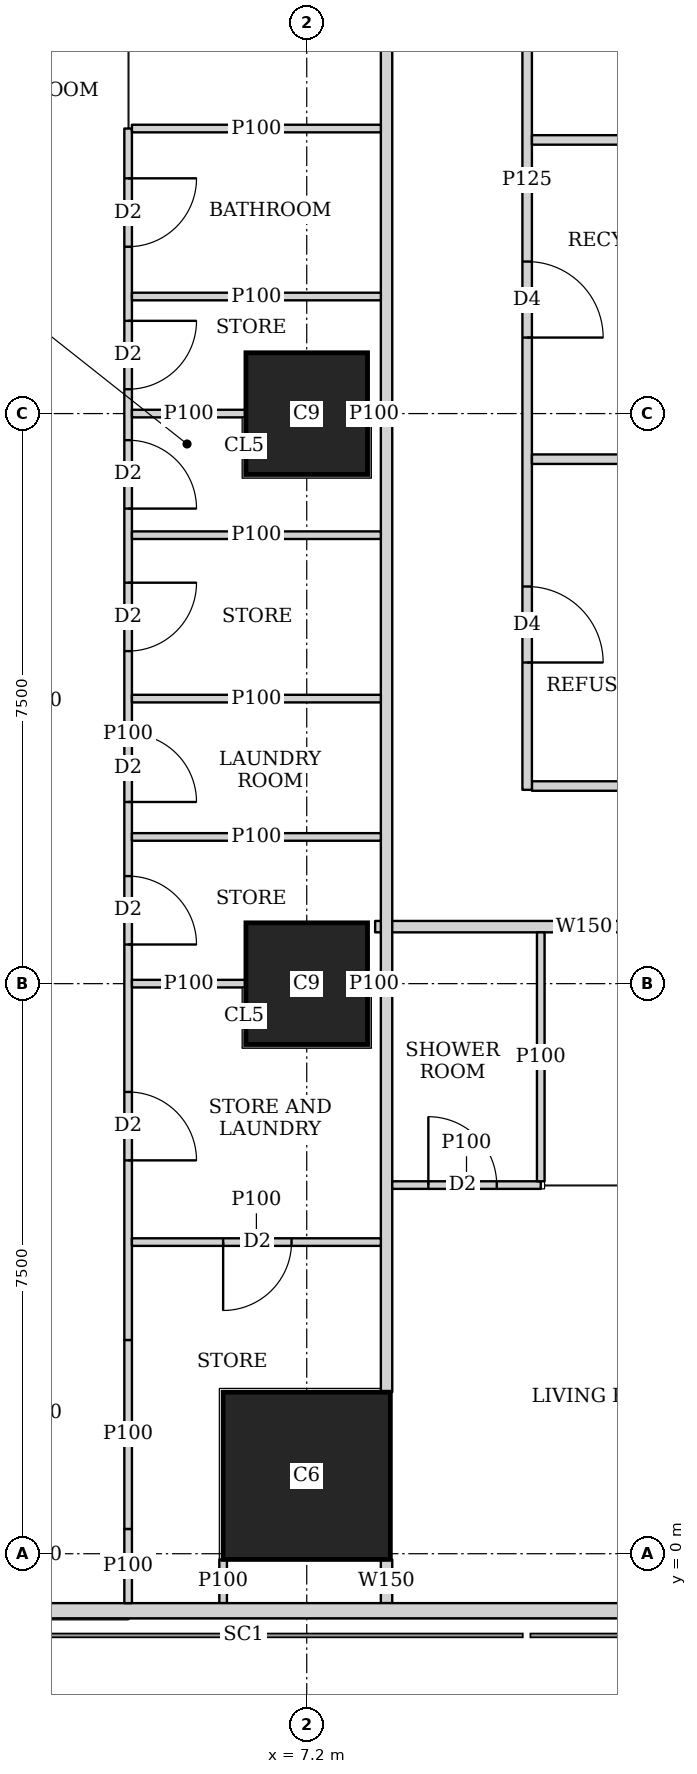
"""IFC4 building model, lengths in metres.
Left out: names, types, materials, properties, quantities, classifications, styles, units other than length and angle.
Written with IfcOpenShell. Run it as: python <this file> out.ifc"""

import sys

from ifc_helpers import new_model, si_unit, direction, frame, frame_2d, origin, origin_2d, place, context, subcontext, project, spatial, rectangle, extrude, element, fill, save


model = new_model("IFC4")
c1 = context("Model", 3, precision=1e-05, world=origin(), true_north=direction((0.0, 1.0)))
c2 = subcontext(c1, "Body", "Model", "MODEL_VIEW")
j1 = project(units=[si_unit("LENGTHUNIT", "METRE"), si_unit("PLANEANGLEUNIT", "RADIAN")], contexts=[c1])
p1 = place(None, origin())
s1 = spatial("IfcSite", under=j1, at=p1, CompositionType="ELEMENT")
p2 = place(p1, origin())
s2 = spatial("IfcBuilding", under=s1, at=p2, CompositionType="ELEMENT")
p3 = place(p2, frame((0.0, 0.0, 81.65)))
s3 = spatial("IfcBuildingStorey", under=s2, at=p3, CompositionType="ELEMENT", Elevation=81.65)
p4 = place(p3, frame((7.2, 1.025, 0.0), z_axis=(0.0, 0.0, 1.0), x_axis=(1.0, 0.0, 0.0)))
e1 = element("IfcColumn", 1, at=p4, inside=s3, PredefinedType="COLUMN", context=c2, shape_type="SweptSolid", body=[
    extrude(rectangle(XDim=2.2, YDim=2.2, at=origin_2d()), origin(), (0.0, 0.0, 1.0), 3.75),
])
for number, where, z_axis, x_axis in (
    (2, (7.2, 7.5, 0.0), (0.0, 0.0, 1.0), (1.0, 0.0, 0.0)),
    (3, (7.2, 15.0, 0.0), (0.0, 0.0, 1.0), (1.0, 0.0, 0.0)),
):
    element("IfcColumn", number, at=place(p3, frame(where, z_axis=z_axis, x_axis=x_axis)), inside=s3, PredefinedType="COLUMN", context=c2, shape_type="SweptSolid", body=[
        extrude(rectangle(XDim=1.6, YDim=1.6, at=origin_2d()), origin(), (0.0, 0.0, 1.0), 3.75),
    ])
p5 = place(p3, frame((2.163, -0.75, 0.0), z_axis=(0.0, 0.0, 1.0), x_axis=(1.0, 0.0, 0.0)))
e4 = element("IfcWall", 4, at=p5, inside=s3, PredefinedType="SOLIDWALL", context=c2, shape_type="SweptSolid", body=[
    extrude(rectangle(XDim=45.628, YDim=0.2, at=frame_2d((22.814, 0.0))), origin(), (0.0, 0.0, 1.0), 3.5),
])
p6 = place(p5, frame((9.537, 0.0, 0.9)))
e5 = element("IfcOpeningElement", 5, at=p6, cuts=e4, PredefinedType="OPENING", context=c2, shape_type="SweptSolid", body=[
    extrude(rectangle(XDim=1.8, YDim=1.5, at=frame_2d((0.9, 0.75))), frame((0.0, 0.11, 0.0), z_axis=(0.0, -1.0, 0.0), x_axis=(1.0, 0.0, 0.0)), (0.0, 0.0, 1.0), 0.22),
])
p7 = place(p5, frame((13.137, 0.0, 0.9)))
e6 = element("IfcOpeningElement", 6, at=p7, cuts=e4, PredefinedType="OPENING", context=c2, shape_type="SweptSolid", body=[
    extrude(rectangle(XDim=1.8, YDim=1.5, at=frame_2d((0.9, 0.75))), frame((0.0, 0.11, 0.0), z_axis=(0.0, -1.0, 0.0), x_axis=(1.0, 0.0, 0.0)), (0.0, 0.0, 1.0), 0.22),
])
p8 = place(p5, frame((16.737, 0.0, 0.9)))
e7 = element("IfcOpeningElement", 7, at=p8, cuts=e4, PredefinedType="OPENING", context=c2, shape_type="SweptSolid", body=[
    extrude(rectangle(XDim=1.8, YDim=1.5, at=frame_2d((0.9, 0.75))), frame((0.0, 0.11, 0.0), z_axis=(0.0, -1.0, 0.0), x_axis=(1.0, 0.0, 0.0)), (0.0, 0.0, 1.0), 0.22),
])
p9 = place(p5, frame((20.337, 0.0, 0.9)))
e8 = element("IfcOpeningElement", 8, at=p9, cuts=e4, PredefinedType="OPENING", context=c2, shape_type="SweptSolid", body=[
    extrude(rectangle(XDim=1.8, YDim=1.5, at=frame_2d((0.9, 0.75))), frame((0.0, 0.11, 0.0), z_axis=(0.0, -1.0, 0.0), x_axis=(1.0, 0.0, 0.0)), (0.0, 0.0, 1.0), 0.22),
])
p10 = place(p5, frame((23.937, 0.0, 0.9)))
e9 = element("IfcOpeningElement", 9, at=p10, cuts=e4, PredefinedType="OPENING", context=c2, shape_type="SweptSolid", body=[
    extrude(rectangle(XDim=1.8, YDim=1.5, at=frame_2d((0.9, 0.75))), frame((0.0, 0.11, 0.0), z_axis=(0.0, -1.0, 0.0), x_axis=(1.0, 0.0, 0.0)), (0.0, 0.0, 1.0), 0.22),
])
p11 = place(p5, frame((27.537, 0.0, 0.9)))
e10 = element("IfcOpeningElement", 10, at=p11, cuts=e4, PredefinedType="OPENING", context=c2, shape_type="SweptSolid", body=[
    extrude(rectangle(XDim=1.8, YDim=1.5, at=frame_2d((0.9, 0.75))), frame((0.0, 0.11, 0.0), z_axis=(0.0, -1.0, 0.0), x_axis=(1.0, 0.0, 0.0)), (0.0, 0.0, 1.0), 0.22),
])
p12 = place(p5, frame((31.137, 0.0, 0.9)))
e11 = element("IfcOpeningElement", 11, at=p12, cuts=e4, PredefinedType="OPENING", context=c2, shape_type="SweptSolid", body=[
    extrude(rectangle(XDim=1.8, YDim=1.5, at=frame_2d((0.9, 0.75))), frame((0.0, 0.11, 0.0), z_axis=(0.0, -1.0, 0.0), x_axis=(1.0, 0.0, 0.0)), (0.0, 0.0, 1.0), 0.22),
])
p13 = place(p5, frame((34.737, 0.0, 0.9)))
e12 = element("IfcOpeningElement", 12, at=p13, cuts=e4, PredefinedType="OPENING", context=c2, shape_type="SweptSolid", body=[
    extrude(rectangle(XDim=1.8, YDim=1.5, at=frame_2d((0.9, 0.75))), frame((0.0, 0.11, 0.0), z_axis=(0.0, -1.0, 0.0), x_axis=(1.0, 0.0, 0.0)), (0.0, 0.0, 1.0), 0.22),
])
p14 = place(p3, frame((8.25, -0.65, 0.0), z_axis=(0.0, 0.0, 1.0), x_axis=(0.0, 1.0, 0.0)))
e13 = element("IfcWall", 13, at=p14, inside=s3, PredefinedType="SOLIDWALL", context=c2, shape_type="SweptSolid", body=[
    extrude(rectangle(XDim=0.574, YDim=0.15, at=frame_2d((0.287, 0.0))), origin(), (0.0, 0.0, 1.0), 3.5),
])
p15 = place(p3, frame((8.25, 2.126, 0.0), z_axis=(0.0, 0.0, 1.0), x_axis=(0.0, 1.0, 0.0)))
e14 = element("IfcWall", 14, at=p15, inside=s3, PredefinedType="SOLIDWALL", context=c2, shape_type="SweptSolid", body=[
    extrude(rectangle(XDim=40.773, YDim=0.15, at=frame_2d((20.386, 0.0))), origin(), (0.0, 0.0, 1.0), 3.5),
])
p16 = place(p15, frame((17.787, 0.0, 0.0)))
e15 = element("IfcOpeningElement", 15, at=p16, cuts=e14, PredefinedType="OPENING", context=c2, shape_type="SweptSolid", body=[
    extrude(rectangle(XDim=1.0, YDim=2.1, at=frame_2d((0.5, 1.05))), frame((0.0, 0.085, 0.0), z_axis=(0.0, -1.0, 0.0), x_axis=(1.0, 0.0, 0.0)), (0.0, 0.0, 1.0), 0.17),
])
p17 = place(p15, frame((21.962, 0.0, 0.0)))
e16 = element("IfcOpeningElement", 16, at=p17, cuts=e14, PredefinedType="OPENING", context=c2, shape_type="SweptSolid", body=[
    extrude(rectangle(XDim=1.0, YDim=2.1, at=frame_2d((0.5, 1.05))), frame((0.0, 0.085, 0.0), z_axis=(0.0, -1.0, 0.0), x_axis=(1.0, 0.0, 0.0)), (0.0, 0.0, 1.0), 0.17),
])
p18 = place(p15, frame((32.787, 0.0, 0.0)))
e17 = element("IfcOpeningElement", 17, at=p18, cuts=e14, PredefinedType="OPENING", context=c2, shape_type="SweptSolid", body=[
    extrude(rectangle(XDim=1.0, YDim=2.1, at=frame_2d((0.5, 1.05))), frame((0.0, 0.085, 0.0), z_axis=(0.0, -1.0, 0.0), x_axis=(1.0, 0.0, 0.0)), (0.0, 0.0, 1.0), 0.17),
])
p19 = place(p3, frame((13.599, 8.25, 0.0), z_axis=(0.0, 0.0, 1.0), x_axis=(-1.0, 0.0, 0.0)))
e18 = element("IfcWall", 18, at=p19, inside=s3, PredefinedType="SOLIDWALL", context=c2, shape_type="SweptSolid", body=[
    extrude(rectangle(XDim=5.499, YDim=0.15, at=frame_2d((2.75, 0.0))), origin(), (0.0, 0.0, 1.0), 3.5),
])
p20 = place(p19, frame((0.76, 0.0, 0.0)))
e19 = element("IfcOpeningElement", 19, at=p20, cuts=e18, PredefinedType="OPENING", context=c2, shape_type="SweptSolid", body=[
    extrude(rectangle(XDim=1.0, YDim=2.1, at=frame_2d((0.5, 1.05))), frame((0.0, 0.085, 0.0), z_axis=(0.0, -1.0, 0.0), x_axis=(1.0, 0.0, 0.0)), (0.0, 0.0, 1.0), 0.17),
])
p21 = place(p3, frame((6.1, -0.65, 0.0), z_axis=(0.0, 0.0, 1.0), x_axis=(0.0, 1.0, 0.0)))
e20 = element("IfcWall", 20, at=p21, inside=s3, PredefinedType="PARTITIONING", context=c2, shape_type="SweptSolid", body=[
    extrude(rectangle(XDim=0.575, YDim=0.1, at=frame_2d((0.288, 0.0))), origin(), (0.0, 0.0, 1.0), 3.5),
])
p22 = place(p3, frame((4.85, -0.65, 0.0), z_axis=(0.0, 0.0, 1.0), x_axis=(0.0, 1.0, 0.0)))
e21 = element("IfcWall", 21, at=p22, inside=s3, PredefinedType="PARTITIONING", context=c2, shape_type="SweptSolid", body=[
    extrude(rectangle(XDim=0.976, YDim=0.1, at=frame_2d((0.488, 0.0))), origin(), (0.0, 0.0, 1.0), 3.5),
])
p23 = place(p3, frame((4.85, 0.326, 0.0), z_axis=(0.0, 0.0, 1.0), x_axis=(0.0, 1.0, 0.0)))
e22 = element("IfcWall", 22, at=p23, inside=s3, PredefinedType="PARTITIONING", context=c2, shape_type="SweptSolid", body=[
    extrude(rectangle(XDim=2.486, YDim=0.1, at=frame_2d((1.243, 0.0))), origin(), (0.0, 0.0, 1.0), 2.05),
])
p24 = place(p3, frame((4.85, 2.812, 0.0), z_axis=(0.0, 0.0, 1.0), x_axis=(0.0, 1.0, 0.0)))
e23 = element("IfcWall", 23, at=p24, inside=s3, PredefinedType="PARTITIONING", context=c2, shape_type="SweptSolid", body=[
    extrude(rectangle(XDim=15.938, YDim=0.1, at=frame_2d((7.969, 0.0))), origin(), (0.0, 0.0, 1.0), 3.5),
])
p25 = place(p24, frame((14.383, 0.0, 0.0)))
e24 = element("IfcOpeningElement", 24, at=p25, cuts=e23, PredefinedType="OPENING", context=c2, shape_type="SweptSolid", body=[
    extrude(rectangle(XDim=0.9, YDim=2.1, at=frame_2d((0.45, 1.05))), frame((0.0, 0.06, 0.0), z_axis=(0.0, -1.0, 0.0), x_axis=(1.0, 0.0, 0.0)), (0.0, 0.0, 1.0), 0.12),
])
p26 = place(p24, frame((10.938, 0.0, 0.0)))
e25 = element("IfcOpeningElement", 25, at=p26, cuts=e23, PredefinedType="OPENING", context=c2, shape_type="SweptSolid", body=[
    extrude(rectangle(XDim=0.9, YDim=2.1, at=frame_2d((0.45, 1.05))), frame((0.0, 0.06, 0.0), z_axis=(0.0, -1.0, 0.0), x_axis=(1.0, 0.0, 0.0)), (0.0, 0.0, 1.0), 0.12),
])
p27 = place(p24, frame((7.078, 0.0, 0.0)))
e26 = element("IfcOpeningElement", 26, at=p27, cuts=e23, PredefinedType="OPENING", context=c2, shape_type="SweptSolid", body=[
    extrude(rectangle(XDim=0.9, YDim=2.1, at=frame_2d((0.45, 1.05))), frame((0.0, 0.06, 0.0), z_axis=(0.0, -1.0, 0.0), x_axis=(1.0, 0.0, 0.0)), (0.0, 0.0, 1.0), 0.12),
])
p28 = place(p24, frame((2.363, 0.0, 0.0)))
e27 = element("IfcOpeningElement", 27, at=p28, cuts=e23, PredefinedType="OPENING", context=c2, shape_type="SweptSolid", body=[
    extrude(rectangle(XDim=0.9, YDim=2.1, at=frame_2d((0.45, 1.05))), frame((0.0, 0.06, 0.0), z_axis=(0.0, -1.0, 0.0), x_axis=(1.0, 0.0, 0.0)), (0.0, 0.0, 1.0), 0.12),
])
p29 = place(p24, frame((12.508, 0.0, 0.0)))
e28 = element("IfcOpeningElement", 28, at=p29, cuts=e23, PredefinedType="OPENING", context=c2, shape_type="SweptSolid", body=[
    extrude(rectangle(XDim=0.9, YDim=2.1, at=frame_2d((0.45, 1.05))), frame((0.0, 0.06, 0.0), z_axis=(0.0, -1.0, 0.0), x_axis=(1.0, 0.0, 0.0)), (0.0, 0.0, 1.0), 0.12),
])
p30 = place(p24, frame((9.063, 0.0, 0.0)))
e29 = element("IfcOpeningElement", 29, at=p30, cuts=e23, PredefinedType="OPENING", context=c2, shape_type="SweptSolid", body=[
    extrude(rectangle(XDim=0.9, YDim=2.1, at=frame_2d((0.45, 1.05))), frame((0.0, 0.06, 0.0), z_axis=(0.0, -1.0, 0.0), x_axis=(1.0, 0.0, 0.0)), (0.0, 0.0, 1.0), 0.12),
])
p31 = place(p24, frame((5.203, 0.0, 0.0)))
e30 = element("IfcOpeningElement", 30, at=p31, cuts=e23, PredefinedType="OPENING", context=c2, shape_type="SweptSolid", body=[
    extrude(rectangle(XDim=0.9, YDim=2.1, at=frame_2d((0.45, 1.05))), frame((0.0, 0.06, 0.0), z_axis=(0.0, -1.0, 0.0), x_axis=(1.0, 0.0, 0.0)), (0.0, 0.0, 1.0), 0.12),
])
p32 = place(p3, frame((4.9, 7.5, 0.0), z_axis=(0.0, 0.0, 1.0), x_axis=(1.0, 0.0, 0.0)))
e31 = element("IfcWall", 31, at=p32, inside=s3, PredefinedType="PARTITIONING", context=c2, shape_type="SweptSolid", body=[
    extrude(rectangle(XDim=1.499, YDim=0.1, at=frame_2d((0.75, 0.0))), origin(), (0.0, 0.0, 1.0), 3.5),
])
p33 = place(p3, frame((8.001, 7.5, 0.0), z_axis=(0.0, 0.0, 1.0), x_axis=(1.0, 0.0, 0.0)))
e32 = element("IfcWall", 32, at=p33, inside=s3, PredefinedType="PARTITIONING", context=c2, shape_type="SweptSolid", body=[
    extrude(rectangle(XDim=0.174, YDim=0.1, at=frame_2d((0.087, 0.0))), origin(), (0.0, 0.0, 1.0), 3.5),
])
p34 = place(p3, frame((4.9, 11.25, 0.0), z_axis=(0.0, 0.0, 1.0), x_axis=(1.0, 0.0, 0.0)))
e33 = element("IfcWall", 33, at=p34, inside=s3, PredefinedType="PARTITIONING", context=c2, shape_type="SweptSolid", body=[
    extrude(rectangle(XDim=3.275, YDim=0.1, at=frame_2d((1.638, 0.0))), origin(), (0.0, 0.0, 1.0), 3.5),
])
p35 = place(p3, frame((4.9, 15.0, 0.0), z_axis=(0.0, 0.0, 1.0), x_axis=(1.0, 0.0, 0.0)))
e34 = element("IfcWall", 34, at=p35, inside=s3, PredefinedType="PARTITIONING", context=c2, shape_type="SweptSolid", body=[
    extrude(rectangle(XDim=1.499, YDim=0.1, at=frame_2d((0.75, 0.0))), origin(), (0.0, 0.0, 1.0), 3.5),
])
p36 = place(p3, frame((8.001, 15.0, 0.0), z_axis=(0.0, 0.0, 1.0), x_axis=(1.0, 0.0, 0.0)))
e35 = element("IfcWall", 35, at=p36, inside=s3, PredefinedType="PARTITIONING", context=c2, shape_type="SweptSolid", body=[
    extrude(rectangle(XDim=0.174, YDim=0.1, at=frame_2d((0.087, 0.0))), origin(), (0.0, 0.0, 1.0), 3.5),
])
for number, where, z_axis, x_axis in (
    (36, (4.9, 18.75, 0.0), (0.0, 0.0, 1.0), (1.0, 0.0, 0.0)),
    (37, (4.9, 16.54, 0.0), (0.0, 0.0, 1.0), (1.0, 0.0, 0.0)),
    (38, (4.9, 13.4, 0.0), (0.0, 0.0, 1.0), (1.0, 0.0, 0.0)),
    (39, (4.9, 9.43, 0.0), (0.0, 0.0, 1.0), (1.0, 0.0, 0.0)),
):
    element("IfcWall", number, at=place(p3, frame(where, z_axis=z_axis, x_axis=x_axis)), inside=s3, PredefinedType="PARTITIONING", context=c2, shape_type="SweptSolid", body=[
        extrude(rectangle(XDim=3.275, YDim=0.1, at=frame_2d((1.638, 0.0))), origin(), (0.0, 0.0, 1.0), 3.5),
    ])
p37 = place(p3, frame((10.279, 4.85, 0.0), z_axis=(0.0, 0.0, 1.0), x_axis=(-1.0, 0.0, 0.0)))
e40 = element("IfcWall", 40, at=p37, inside=s3, PredefinedType="PARTITIONING", context=c2, shape_type="SweptSolid", body=[
    extrude(rectangle(XDim=1.954, YDim=0.1, at=frame_2d((0.977, 0.0))), origin(), (0.0, 0.0, 1.0), 3.5),
])
p38 = place(p37, frame((0.579, 0.0, 0.0)))
e41 = element("IfcOpeningElement", 41, at=p38, cuts=e40, PredefinedType="OPENING", context=c2, shape_type="SweptSolid", body=[
    extrude(rectangle(XDim=0.9, YDim=2.1, at=frame_2d((0.45, 1.05))), frame((0.0, 0.06, 0.0), z_axis=(0.0, -1.0, 0.0), x_axis=(1.0, 0.0, 0.0)), (0.0, 0.0, 1.0), 0.12),
])
p39 = place(p3, frame((10.279, 4.9, 0.0), z_axis=(0.0, 0.0, 1.0), x_axis=(0.0, 1.0, 0.0)))
e42 = element("IfcWall", 42, at=p39, inside=s3, PredefinedType="PARTITIONING", context=c2, shape_type="SweptSolid", body=[
    extrude(rectangle(XDim=3.275, YDim=0.1, at=frame_2d((1.638, 0.0))), origin(), (0.0, 0.0, 1.0), 3.5),
])
p40 = place(p3, frame((8.175, 4.1, 0.0), z_axis=(0.0, 0.0, 1.0), x_axis=(-1.0, 0.0, 0.0)))
e43 = element("IfcWall", 43, at=p40, inside=s3, PredefinedType="PARTITIONING", context=c2, shape_type="SweptSolid", body=[
    extrude(rectangle(XDim=3.275, YDim=0.1, at=frame_2d((1.638, 0.0))), origin(), (0.0, 0.0, 1.0), 3.5),
])
p41 = place(p40, frame((1.175, 0.0, 0.0)))
e44 = element("IfcOpeningElement", 44, at=p41, cuts=e43, PredefinedType="OPENING", context=c2, shape_type="SweptSolid", body=[
    extrude(rectangle(XDim=0.9, YDim=2.1, at=frame_2d((0.45, 1.05))), frame((0.0, 0.06, 0.0), z_axis=(0.0, -1.0, 0.0), x_axis=(1.0, 0.0, 0.0)), (0.0, 0.0, 1.0), 0.12),
])
p42 = place(p3, frame((10.1, 10.05, 0.0), z_axis=(0.0, 0.0, 1.0), x_axis=(0.0, 1.0, 0.0)))
e45 = element("IfcWall", 45, at=p42, inside=s3, PredefinedType="PARTITIONING", context=c2, shape_type="SweptSolid", body=[
    extrude(rectangle(XDim=16.05, YDim=0.125, at=frame_2d((8.025, 0.0))), origin(), (0.0, 0.0, 1.0), 3.5),
])
p43 = place(p42, frame((1.675, 0.0, 0.0)))
e46 = element("IfcOpeningElement", 46, at=p43, cuts=e45, PredefinedType="OPENING", context=c2, shape_type="SweptSolid", body=[
    extrude(rectangle(XDim=1.0, YDim=2.1, at=frame_2d((0.5, 1.05))), frame((0.0, 0.073, 0.0), z_axis=(0.0, -1.0, 0.0), x_axis=(1.0, 0.0, 0.0)), (0.0, 0.0, 1.0), 0.145),
])
p44 = place(p42, frame((5.95, 0.0, 0.0)))
e47 = element("IfcOpeningElement", 47, at=p44, cuts=e45, PredefinedType="OPENING", context=c2, shape_type="SweptSolid", body=[
    extrude(rectangle(XDim=1.0, YDim=2.1, at=frame_2d((0.5, 1.05))), frame((0.0, 0.073, 0.0), z_axis=(0.0, -1.0, 0.0), x_axis=(1.0, 0.0, 0.0)), (0.0, 0.0, 1.0), 0.145),
])
p45 = place(p42, frame((11.8, 0.0, 0.0)))
e48 = element("IfcOpeningElement", 48, at=p45, cuts=e45, PredefinedType="OPENING", context=c2, shape_type="SweptSolid", body=[
    extrude(rectangle(XDim=1.0, YDim=2.1, at=frame_2d((0.5, 1.05))), frame((0.0, 0.073, 0.0), z_axis=(0.0, -1.0, 0.0), x_axis=(1.0, 0.0, 0.0)), (0.0, 0.0, 1.0), 0.145),
])
p46 = place(p3, frame((10.163, 14.4, 0.0), z_axis=(0.0, 0.0, 1.0), x_axis=(1.0, 0.0, 0.0)))
e49 = element("IfcWall", 49, at=p46, inside=s3, PredefinedType="PARTITIONING", context=c2, shape_type="SweptSolid", body=[
    extrude(rectangle(XDim=3.725, YDim=0.125, at=frame_2d((1.862, 0.0))), origin(), (0.0, 0.0, 1.0), 3.5),
])
p47 = place(p3, frame((10.163, 18.6, 0.0), z_axis=(0.0, 0.0, 1.0), x_axis=(1.0, 0.0, 0.0)))
e50 = element("IfcWall", 50, at=p47, inside=s3, PredefinedType="PARTITIONING", context=c2, shape_type="SweptSolid", body=[
    extrude(rectangle(XDim=3.787, YDim=0.125, at=frame_2d((1.894, 0.0))), origin(), (0.0, 0.0, 1.0), 3.5),
])
p48 = place(p3, frame((10.163, 10.1, 0.0), z_axis=(0.0, 0.0, 1.0), x_axis=(1.0, 0.0, 0.0)))
e51 = element("IfcWall", 51, at=p48, inside=s3, PredefinedType="PARTITIONING", context=c2, shape_type="SweptSolid", body=[
    extrude(rectangle(XDim=11.287, YDim=0.125, at=frame_2d((5.644, 0.0))), origin(), (0.0, 0.0, 1.0), 3.5),
])
p49 = place(p48, frame((7.832, 0.0, 0.0)))
e52 = element("IfcOpeningElement", 52, at=p49, cuts=e51, PredefinedType="OPENING", context=c2, shape_type="SweptSolid", body=[
    extrude(rectangle(XDim=1.8, YDim=2.1, at=frame_2d((0.9, 1.05))), frame((0.0, 0.073, 0.0), z_axis=(0.0, -1.0, 0.0), x_axis=(1.0, 0.0, 0.0)), (0.0, 0.0, 1.0), 0.145),
])
p50 = place(p25, origin())
e53 = element("IfcDoor", 53, at=p50, inside=s3, OperationType="SINGLE_SWING_LEFT", PredefinedType="DOOR", context=c2, shape_type="SweptSolid", body=[
    extrude(rectangle(XDim=0.9, YDim=2.1, at=frame_2d((0.45, 1.05))), frame((0.0, 0.025, 0.0), z_axis=(0.0, -1.0, 0.0), x_axis=(1.0, 0.0, 0.0)), (0.0, 0.0, 1.0), 0.05),
])
fill(e24, e53)
p51 = place(p26, origin())
e54 = element("IfcDoor", 54, at=p51, inside=s3, OperationType="SINGLE_SWING_RIGHT", PredefinedType="DOOR", context=c2, shape_type="SweptSolid", body=[
    extrude(rectangle(XDim=0.9, YDim=2.1, at=frame_2d((0.45, 1.05))), frame((0.0, 0.025, 0.0), z_axis=(0.0, -1.0, 0.0), x_axis=(1.0, 0.0, 0.0)), (0.0, 0.0, 1.0), 0.05),
])
fill(e25, e54)
p52 = place(p27, origin())
e55 = element("IfcDoor", 55, at=p52, inside=s3, OperationType="SINGLE_SWING_RIGHT", PredefinedType="DOOR", context=c2, shape_type="SweptSolid", body=[
    extrude(rectangle(XDim=0.9, YDim=2.1, at=frame_2d((0.45, 1.05))), frame((0.0, 0.025, 0.0), z_axis=(0.0, -1.0, 0.0), x_axis=(1.0, 0.0, 0.0)), (0.0, 0.0, 1.0), 0.05),
])
fill(e26, e55)
p53 = place(p28, origin())
e56 = element("IfcDoor", 56, at=p53, inside=s3, OperationType="SINGLE_SWING_RIGHT", PredefinedType="DOOR", context=c2, shape_type="SweptSolid", body=[
    extrude(rectangle(XDim=0.9, YDim=2.1, at=frame_2d((0.45, 1.05))), frame((0.0, 0.025, 0.0), z_axis=(0.0, -1.0, 0.0), x_axis=(1.0, 0.0, 0.0)), (0.0, 0.0, 1.0), 0.05),
])
fill(e27, e56)
p54 = place(p29, origin())
e57 = element("IfcDoor", 57, at=p54, inside=s3, OperationType="SINGLE_SWING_LEFT", PredefinedType="DOOR", context=c2, shape_type="SweptSolid", body=[
    extrude(rectangle(XDim=0.9, YDim=2.1, at=frame_2d((0.45, 1.05))), frame((0.0, 0.025, 0.0), z_axis=(0.0, -1.0, 0.0), x_axis=(1.0, 0.0, 0.0)), (0.0, 0.0, 1.0), 0.05),
])
fill(e28, e57)
p55 = place(p30, origin())
e58 = element("IfcDoor", 58, at=p55, inside=s3, OperationType="SINGLE_SWING_LEFT", PredefinedType="DOOR", context=c2, shape_type="SweptSolid", body=[
    extrude(rectangle(XDim=0.9, YDim=2.1, at=frame_2d((0.45, 1.05))), frame((0.0, 0.025, 0.0), z_axis=(0.0, -1.0, 0.0), x_axis=(1.0, 0.0, 0.0)), (0.0, 0.0, 1.0), 0.05),
])
fill(e29, e58)
p56 = place(p31, origin())
e59 = element("IfcDoor", 59, at=p56, inside=s3, OperationType="SINGLE_SWING_RIGHT", PredefinedType="DOOR", context=c2, shape_type="SweptSolid", body=[
    extrude(rectangle(XDim=0.9, YDim=2.1, at=frame_2d((0.45, 1.05))), frame((0.0, 0.025, 0.0), z_axis=(0.0, -1.0, 0.0), x_axis=(1.0, 0.0, 0.0)), (0.0, 0.0, 1.0), 0.05),
])
fill(e30, e59)
p57 = place(p38, origin())
e60 = element("IfcDoor", 60, at=p57, inside=s3, OperationType="SINGLE_SWING_LEFT", PredefinedType="DOOR", context=c2, shape_type="SweptSolid", body=[
    extrude(rectangle(XDim=0.9, YDim=2.1, at=frame_2d((0.45, 1.05))), frame((0.0, 0.025, 0.0), z_axis=(0.0, -1.0, 0.0), x_axis=(1.0, 0.0, 0.0)), (0.0, 0.0, 1.0), 0.05),
])
fill(e41, e60)
p58 = place(p41, origin())
e61 = element("IfcDoor", 61, at=p58, inside=s3, OperationType="SINGLE_SWING_RIGHT", PredefinedType="DOOR", context=c2, shape_type="SweptSolid", body=[
    extrude(rectangle(XDim=0.9, YDim=2.1, at=frame_2d((0.45, 1.05))), frame((0.0, 0.025, 0.0), z_axis=(0.0, -1.0, 0.0), x_axis=(1.0, 0.0, 0.0)), (0.0, 0.0, 1.0), 0.05),
])
fill(e44, e61)
p59 = place(p43, origin())
e62 = element("IfcDoor", 62, at=p59, inside=s3, OperationType="SINGLE_SWING_RIGHT", PredefinedType="DOOR", context=c2, shape_type="SweptSolid", body=[
    extrude(rectangle(XDim=1.0, YDim=2.1, at=frame_2d((0.5, 1.05))), frame((0.0, 0.025, 0.0), z_axis=(0.0, -1.0, 0.0), x_axis=(1.0, 0.0, 0.0)), (0.0, 0.0, 1.0), 0.05),
])
fill(e46, e62)
p60 = place(p44, origin())
e63 = element("IfcDoor", 63, at=p60, inside=s3, OperationType="SINGLE_SWING_RIGHT", PredefinedType="DOOR", context=c2, shape_type="SweptSolid", body=[
    extrude(rectangle(XDim=1.0, YDim=2.1, at=frame_2d((0.5, 1.05))), frame((0.0, 0.025, 0.0), z_axis=(0.0, -1.0, 0.0), x_axis=(1.0, 0.0, 0.0)), (0.0, 0.0, 1.0), 0.05),
])
fill(e47, e63)
save(model, sys.argv[1])
